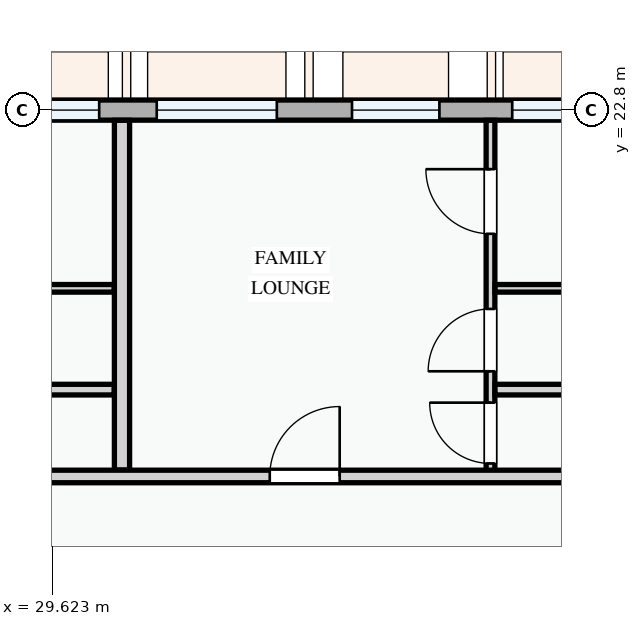
"""IFC4 building model, lengths in metres.
Left out: names, types, materials, properties, quantities, classifications, styles, units other than length and angle.
Written with IfcOpenShell. Run it as: python <this file> out.ifc"""

import sys

from ifc_helpers import new_model, si_unit, direction, frame, frame_2d, origin, place, context, subcontext, project, spatial, rectangle, extrude, element, fill, save


model = new_model("IFC4")
c1 = context("Model", 3, precision=1e-05, world=origin(), true_north=direction((0.0, 1.0)))
c2 = subcontext(c1, "Body", "Model", "MODEL_VIEW")
j1 = project(units=[si_unit("LENGTHUNIT", "METRE"), si_unit("PLANEANGLEUNIT", "RADIAN")], contexts=[c1])
p1 = place(None, origin())
s1 = spatial("IfcSite", under=j1, at=p1, CompositionType="ELEMENT")
p2 = place(p1, origin())
s2 = spatial("IfcBuilding", under=s1, at=p2, CompositionType="ELEMENT")
p3 = place(p2, frame((0.0, 0.0, 27.9)))
s3 = spatial("IfcBuildingStorey", under=s2, at=p3, CompositionType="ELEMENT", Elevation=27.9)
p4 = place(p3, frame((37.2, 22.8, 0.0), z_axis=(0.0, 0.0, 1.0), x_axis=(-1.0, 0.0, 0.0)))
e1 = element("IfcWall", 1, at=p4, inside=s3, PredefinedType="STANDARD", context=c2, shape_type="SweptSolid", body=[
    extrude(rectangle(XDim=8.4, YDim=0.265, at=frame_2d((4.2, 0.0))), origin(), (0.0, 0.0, 1.0), 2.375),
])
p5 = place(p4, frame((0.476, 0.0, 0.78)))
e2 = element("IfcOpeningElement", 2, at=p5, cuts=e1, PredefinedType="OPENING", context=c2, shape_type="SweptSolid", body=[
    extrude(rectangle(XDim=1.05, YDim=1.2, at=frame_2d((0.525, 0.6))), frame((0.0, 0.143, 0.0), z_axis=(0.0, -1.0, 0.0), x_axis=(1.0, 0.0, 0.0)), (0.0, 0.0, 1.0), 0.285),
])
p6 = place(p4, frame((2.484, 0.0, 0.78)))
e3 = element("IfcOpeningElement", 3, at=p6, cuts=e1, PredefinedType="OPENING", context=c2, shape_type="SweptSolid", body=[
    extrude(rectangle(XDim=1.15, YDim=1.25, at=frame_2d((0.575, 0.625))), frame((0.0, 0.143, 0.0), z_axis=(0.0, -1.0, 0.0), x_axis=(1.0, 0.0, 0.0)), (0.0, 0.0, 1.0), 0.285),
])
p7 = place(p4, frame((4.623, 0.0, 0.78)))
e4 = element("IfcOpeningElement", 4, at=p7, cuts=e1, PredefinedType="OPENING", context=c2, shape_type="SweptSolid", body=[
    extrude(rectangle(XDim=1.58, YDim=1.48, at=frame_2d((0.79, 0.74))), frame((0.0, 0.143, 0.0), z_axis=(0.0, -1.0, 0.0), x_axis=(1.0, 0.0, 0.0)), (0.0, 0.0, 1.0), 0.285),
])
p8 = place(p4, frame((6.96, 0.0, 0.78)))
e5 = element("IfcOpeningElement", 5, at=p8, cuts=e1, PredefinedType="OPENING", context=c2, shape_type="SweptSolid", body=[
    extrude(rectangle(XDim=0.95, YDim=1.15, at=frame_2d((0.475, 0.575))), frame((0.0, 0.143, 0.0), z_axis=(0.0, -1.0, 0.0), x_axis=(1.0, 0.0, 0.0)), (0.0, 0.0, 1.0), 0.285),
])
p9 = place(p3, frame((26.502, 20.455, 0.0), z_axis=(0.0, 0.0, 1.0), x_axis=(1.0, 0.0, 0.0)))
e6 = element("IfcWall", 6, at=p9, inside=s3, PredefinedType="PARTITIONING", context=c2, shape_type="SweptSolid", body=[
    extrude(rectangle(XDim=3.936, YDim=0.1, at=frame_2d((1.968, 0.0))), origin(), (0.0, 0.0, 1.0), 3.0),
])
p10 = place(p3, frame((26.502, 19.122, 0.0), z_axis=(0.0, 0.0, 1.0), x_axis=(1.0, 0.0, 0.0)))
e7 = element("IfcWall", 7, at=p10, inside=s3, PredefinedType="PARTITIONING", context=c2, shape_type="SweptSolid", body=[
    extrude(rectangle(XDim=3.936, YDim=0.14, at=frame_2d((1.968, 0.0))), origin(), (0.0, 0.0, 1.0), 3.0),
])
p11 = place(p3, frame((35.388, 17.98, 0.0), z_axis=(0.0, 0.0, 1.0), x_axis=(0.0, 1.0, 0.0)))
e8 = element("IfcWall", 8, at=p11, inside=s3, PredefinedType="PARTITIONING", context=c2, shape_type="SweptSolid", body=[
    extrude(rectangle(XDim=4.686, YDim=0.115, at=frame_2d((2.343, 0.0))), origin(), (0.0, 0.0, 1.0), 3.0),
])
p12 = place(p11, frame((0.171, 0.0, 0.0)))
e9 = element("IfcOpeningElement", 9, at=p12, cuts=e8, PredefinedType="OPENING", context=c2, shape_type="SweptSolid", body=[
    extrude(rectangle(XDim=0.8, YDim=2.1, at=frame_2d((0.4, 1.05))), frame((0.0, 0.067, 0.0), z_axis=(0.0, -1.0, 0.0), x_axis=(1.0, 0.0, 0.0)), (0.0, 0.0, 1.0), 0.135),
])
p13 = place(p11, frame((1.384, 0.0, 0.0)))
e10 = element("IfcOpeningElement", 10, at=p13, cuts=e8, PredefinedType="OPENING", context=c2, shape_type="SweptSolid", body=[
    extrude(rectangle(XDim=0.82, YDim=2.08, at=frame_2d((0.41, 1.04))), frame((0.0, 0.067, 0.0), z_axis=(0.0, -1.0, 0.0), x_axis=(1.0, 0.0, 0.0)), (0.0, 0.0, 1.0), 0.135),
])
p14 = place(p11, frame((3.193, 0.0, 0.0)))
e11 = element("IfcOpeningElement", 11, at=p14, cuts=e8, PredefinedType="OPENING", context=c2, shape_type="SweptSolid", body=[
    extrude(rectangle(XDim=0.85, YDim=2.1, at=frame_2d((0.425, 1.05))), frame((0.0, 0.067, 0.0), z_axis=(0.0, -1.0, 0.0), x_axis=(1.0, 0.0, 0.0)), (0.0, 0.0, 1.0), 0.135),
])
p15 = place(p3, frame((35.448, 20.455, 0.0), z_axis=(0.0, 0.0, 1.0), x_axis=(1.0, 0.0, 0.0)))
e12 = element("IfcWall", 12, at=p15, inside=s3, PredefinedType="PARTITIONING", context=c2, shape_type="SweptSolid", body=[
    extrude(rectangle(XDim=7.618, YDim=0.1, at=frame_2d((3.809, 0.0))), origin(), (0.0, 0.0, 1.0), 3.0),
])
p16 = place(p3, frame((35.448, 19.122, 0.0), z_axis=(0.0, 0.0, 1.0), x_axis=(1.0, 0.0, 0.0)))
e13 = element("IfcWall", 13, at=p16, inside=s3, PredefinedType="PARTITIONING", context=c2, shape_type="SweptSolid", body=[
    extrude(rectangle(XDim=7.618, YDim=0.14, at=frame_2d((3.809, 0.0))), origin(), (0.0, 0.0, 1.0), 3.0),
])
p17 = place(p3, frame((30.54, 18.064, 0.0), z_axis=(0.0, 0.0, 1.0), x_axis=(0.0, 1.0, 0.0)))
e14 = element("IfcWall", 14, at=p17, inside=s3, PredefinedType="PARTITIONING", context=c2, shape_type="SweptSolid", body=[
    extrude(rectangle(XDim=4.601, YDim=0.2, at=frame_2d((2.301, 0.0))), origin(), (0.0, 0.0, 1.0), 3.0),
])
p18 = place(p3, frame((22.66, 17.98, 0.0), z_axis=(0.0, 0.0, 1.0), x_axis=(1.0, 0.0, 0.0)))
e15 = element("IfcWall", 15, at=p18, inside=s3, PredefinedType="PARTITIONING", context=c2, shape_type="SweptSolid", body=[
    extrude(rectangle(XDim=20.406, YDim=0.165, at=frame_2d((10.203, 0.0))), origin(), (0.0, 0.0, 1.0), 3.0),
])
p19 = place(p18, frame((2.573, 0.0, 0.0)))
e16 = element("IfcOpeningElement", 16, at=p19, cuts=e15, PredefinedType="OPENING", context=c2, shape_type="SweptSolid", body=[
    extrude(rectangle(XDim=0.96, YDim=2.12, at=frame_2d((0.48, 1.06))), frame((0.0, 0.093, 0.0), z_axis=(0.0, -1.0, 0.0), x_axis=(1.0, 0.0, 0.0)), (0.0, 0.0, 1.0), 0.185),
])
p20 = place(p18, frame((9.824, 0.0, 0.0)))
e17 = element("IfcOpeningElement", 17, at=p20, cuts=e15, PredefinedType="OPENING", context=c2, shape_type="SweptSolid", body=[
    extrude(rectangle(XDim=0.92, YDim=2.1, at=frame_2d((0.46, 1.05))), frame((0.0, 0.093, 0.0), z_axis=(0.0, -1.0, 0.0), x_axis=(1.0, 0.0, 0.0)), (0.0, 0.0, 1.0), 0.185),
])
p21 = place(p5, origin())
e18 = element("IfcWindow", 18, at=p21, inside=s3, PartitioningType="SINGLE_PANEL", PredefinedType="WINDOW", context=c2, shape_type="SweptSolid", body=[
    extrude(rectangle(XDim=1.05, YDim=1.2, at=frame_2d((0.525, 0.6))), frame((0.0, 0.03, 0.0), z_axis=(0.0, -1.0, 0.0), x_axis=(1.0, 0.0, 0.0)), (0.0, 0.0, 1.0), 0.06),
])
fill(e2, e18)
p22 = place(p6, origin())
e19 = element("IfcWindow", 19, at=p22, inside=s3, PartitioningType="SINGLE_PANEL", PredefinedType="WINDOW", context=c2, shape_type="SweptSolid", body=[
    extrude(rectangle(XDim=1.15, YDim=1.25, at=frame_2d((0.575, 0.625))), frame((0.0, 0.03, 0.0), z_axis=(0.0, -1.0, 0.0), x_axis=(1.0, 0.0, 0.0)), (0.0, 0.0, 1.0), 0.06),
])
fill(e3, e19)
p23 = place(p7, origin())
e20 = element("IfcWindow", 20, at=p23, inside=s3, PartitioningType="SINGLE_PANEL", PredefinedType="WINDOW", context=c2, shape_type="SweptSolid", body=[
    extrude(rectangle(XDim=1.58, YDim=1.48, at=frame_2d((0.79, 0.74))), frame((0.0, 0.03, 0.0), z_axis=(0.0, -1.0, 0.0), x_axis=(1.0, 0.0, 0.0)), (0.0, 0.0, 1.0), 0.06),
])
fill(e4, e20)
p24 = place(p8, origin())
e21 = element("IfcWindow", 21, at=p24, inside=s3, PartitioningType="SINGLE_PANEL", PredefinedType="WINDOW", context=c2, shape_type="SweptSolid", body=[
    extrude(rectangle(XDim=0.95, YDim=1.15, at=frame_2d((0.475, 0.575))), frame((0.0, 0.03, 0.0), z_axis=(0.0, -1.0, 0.0), x_axis=(1.0, 0.0, 0.0)), (0.0, 0.0, 1.0), 0.06),
])
fill(e5, e21)
p25 = place(p12, origin())
e22 = element("IfcDoor", 22, at=p25, inside=s3, OperationType="SINGLE_SWING_RIGHT", PredefinedType="DOOR", context=c2, shape_type="SweptSolid", body=[
    extrude(rectangle(XDim=0.8, YDim=2.1, at=frame_2d((0.4, 1.05))), frame((0.0, 0.025, 0.0), z_axis=(0.0, -1.0, 0.0), x_axis=(1.0, 0.0, 0.0)), (0.0, 0.0, 1.0), 0.05),
])
fill(e9, e22)
p26 = place(p13, origin())
e23 = element("IfcDoor", 23, at=p26, inside=s3, OperationType="SINGLE_SWING_LEFT", PredefinedType="DOOR", context=c2, shape_type="SweptSolid", body=[
    extrude(rectangle(XDim=0.82, YDim=2.08, at=frame_2d((0.41, 1.04))), frame((0.0, 0.025, 0.0), z_axis=(0.0, -1.0, 0.0), x_axis=(1.0, 0.0, 0.0)), (0.0, 0.0, 1.0), 0.05),
])
fill(e10, e23)
p27 = place(p14, origin())
e24 = element("IfcDoor", 24, at=p27, inside=s3, OperationType="SINGLE_SWING_RIGHT", PredefinedType="DOOR", context=c2, shape_type="SweptSolid", body=[
    extrude(rectangle(XDim=0.85, YDim=2.1, at=frame_2d((0.425, 1.05))), frame((0.0, 0.025, 0.0), z_axis=(0.0, -1.0, 0.0), x_axis=(1.0, 0.0, 0.0)), (0.0, 0.0, 1.0), 0.05),
])
fill(e11, e24)
p28 = place(p20, origin())
e25 = element("IfcDoor", 25, at=p28, inside=s3, OperationType="SINGLE_SWING_RIGHT", PredefinedType="DOOR", context=c2, shape_type="SweptSolid", body=[
    extrude(rectangle(XDim=0.92, YDim=2.1, at=frame_2d((0.46, 1.05))), frame((0.0, 0.025, 0.0), z_axis=(0.0, -1.0, 0.0), x_axis=(1.0, 0.0, 0.0)), (0.0, 0.0, 1.0), 0.05),
])
fill(e17, e25)
save(model, sys.argv[1])
